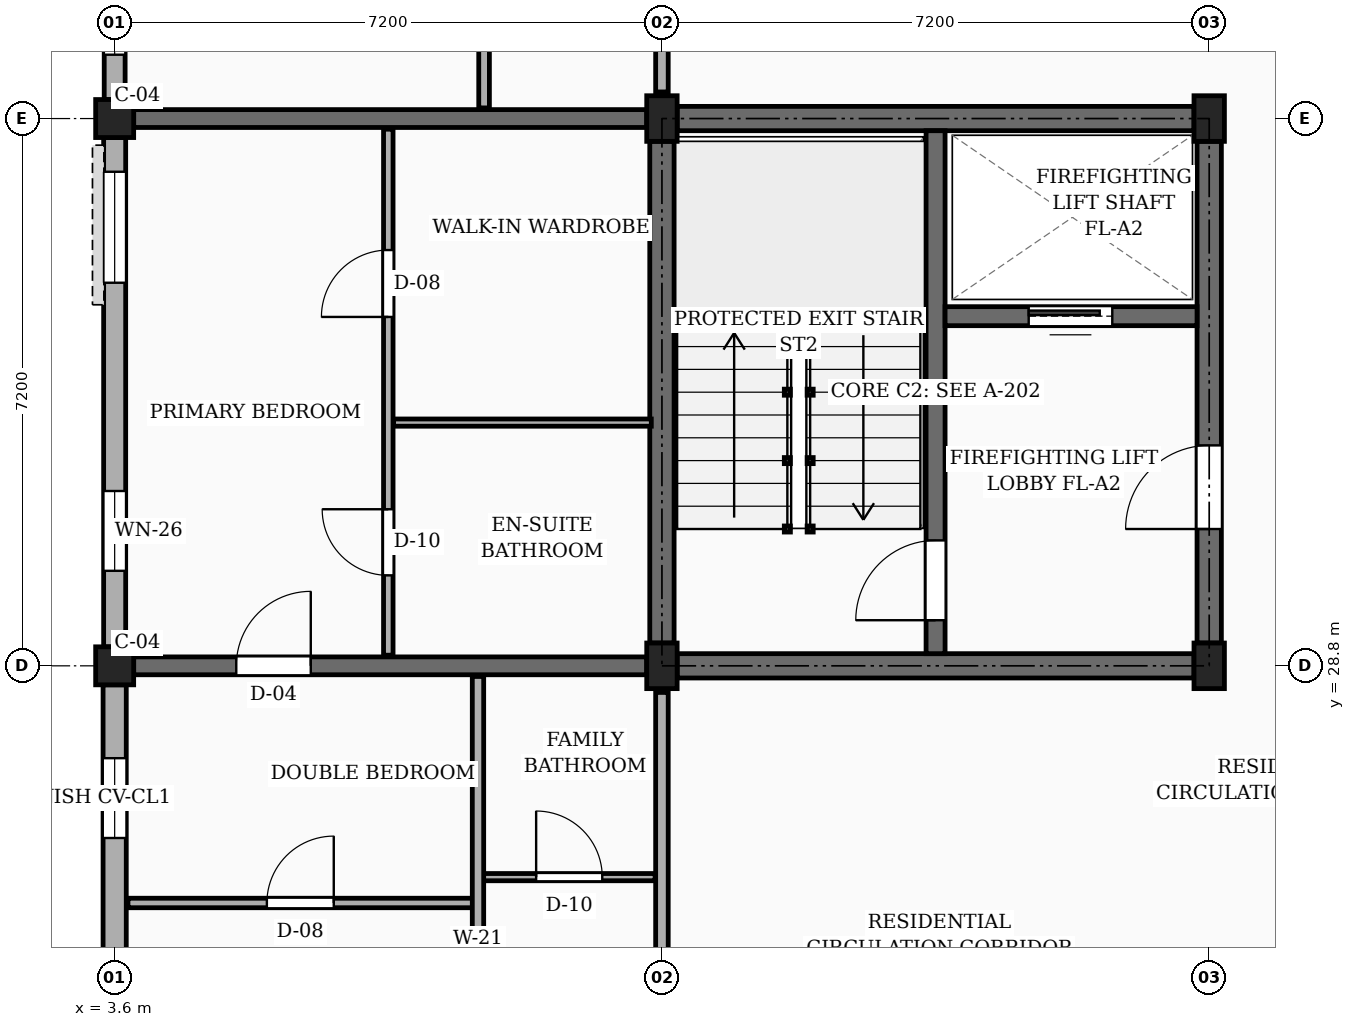
"""IFC4 building model, lengths in metres.
Left out: names, types, materials, properties, quantities, classifications, styles, units other than length and angle.
Written with IfcOpenShell. Run it as: python <this file> out.ifc"""

import sys

from ifc_helpers import new_model, si_unit, direction, frame, frame_2d, origin, origin_2d, place, context, subcontext, project, spatial, rectangle, extrude, element, fill, save


model = new_model("IFC4")
c1 = context("Model", 3, precision=1e-05, world=origin(), true_north=direction((0.0, 1.0)))
c2 = subcontext(c1, "Body", "Model", "MODEL_VIEW")
j1 = project(units=[si_unit("LENGTHUNIT", "METRE"), si_unit("PLANEANGLEUNIT", "RADIAN")], contexts=[c1])
p1 = place(None, origin())
s1 = spatial("IfcSite", under=j1, at=p1, CompositionType="ELEMENT")
p2 = place(p1, origin())
s2 = spatial("IfcBuilding", under=s1, at=p2, CompositionType="ELEMENT")
p3 = place(p2, frame((0.0, 0.0, 23.4)))
s3 = spatial("IfcBuildingStorey", under=s2, at=p3, CompositionType="ELEMENT", Elevation=23.4)
for number, where, z_axis, x_axis in (
    (1, (3.6, 28.8, 0.0), (0.0, 0.0, 1.0), (1.0, 0.0, 0.0)),
    (2, (3.6, 36.0, 0.0), (0.0, 0.0, 1.0), (1.0, 0.0, 0.0)),
):
    element("IfcColumn", number, at=place(p3, frame(where, z_axis=z_axis, x_axis=x_axis)), inside=s3, PredefinedType="COLUMN", context=c2, shape_type="SweptSolid", body=[
        extrude(rectangle(XDim=0.5, YDim=0.5, at=origin_2d()), origin(), (0.0, 0.0, 1.0), 3.15),
    ])
for number, where, z_axis, x_axis in (
    (3, (10.8, 28.8, 0.0), (0.0, 0.0, 1.0), (1.0, 0.0, 0.0)),
    (4, (10.8, 36.0, 0.0), (0.0, 0.0, 1.0), (1.0, 0.0, 0.0)),
    (5, (18.0, 28.8, 0.0), (0.0, 0.0, 1.0), (1.0, 0.0, 0.0)),
    (6, (18.0, 36.0, 0.0), (0.0, 0.0, 1.0), (1.0, 0.0, 0.0)),
):
    element("IfcColumn", number, at=place(p3, frame(where, z_axis=z_axis, x_axis=x_axis)), inside=s3, PredefinedType="COLUMN", context=c2, shape_type="SweptSolid", body=[
        extrude(rectangle(XDim=0.4, YDim=0.6, at=origin_2d()), origin(), (0.0, 0.0, 1.0), 3.15),
    ])
p4 = place(p3, frame((3.85, 28.8, 0.0), z_axis=(0.0, 0.0, 1.0), x_axis=(1.0, 0.0, 0.0)))
e7 = element("IfcWall", 7, at=p4, inside=s3, PredefinedType="SOLIDWALL", context=c2, shape_type="SweptSolid", body=[
    extrude(rectangle(XDim=6.75, YDim=0.235, at=frame_2d((3.375, 0.0))), origin(), (0.0, 0.0, 1.0), 2.17),
])
p5 = place(p4, frame((1.35, 0.0, 0.0)))
e8 = element("IfcOpeningElement", 8, at=p5, cuts=e7, PredefinedType="OPENING", context=c2, shape_type="SweptSolid", body=[
    extrude(rectangle(XDim=0.98, YDim=2.12, at=frame_2d((0.49, 1.06))), frame((0.0, 0.127, 0.0), z_axis=(0.0, -1.0, 0.0), x_axis=(1.0, 0.0, 0.0)), (0.0, 0.0, 1.0), 0.255),
])
p6 = place(p3, frame((3.85, 36.0, 0.0), z_axis=(0.0, 0.0, 1.0), x_axis=(1.0, 0.0, 0.0)))
e9 = element("IfcWall", 9, at=p6, inside=s3, PredefinedType="SOLIDWALL", context=c2, shape_type="SweptSolid", body=[
    extrude(rectangle(XDim=6.75, YDim=0.235, at=frame_2d((3.375, 0.0))), origin(), (0.0, 0.0, 1.0), 2.17),
])
p7 = place(p3, frame((3.6, 42.95, 0.0), z_axis=(0.0, 0.0, 1.0), x_axis=(0.0, -1.0, 0.0)))
e10 = element("IfcWall", 10, at=p7, inside=s3, PredefinedType="SOLIDWALL", context=c2, shape_type="SweptSolid", body=[
    extrude(rectangle(XDim=6.7, YDim=0.275, at=frame_2d((3.35, 0.0))), origin(), (0.0, 0.0, 1.0), 2.44),
])
p8 = place(p7, frame((0.45, 0.0, 0.78)))
e11 = element("IfcOpeningElement", 11, at=p8, cuts=e10, PredefinedType="OPENING", context=c2, shape_type="SweptSolid", body=[
    extrude(rectangle(XDim=1.3, YDim=1.36, at=frame_2d((0.65, 0.68))), frame((0.0, 0.147, 0.0), z_axis=(0.0, -1.0, 0.0), x_axis=(1.0, 0.0, 0.0)), (0.0, 0.0, 1.0), 0.295),
])
p9 = place(p7, frame((4.65, 0.0, 0.78)))
e12 = element("IfcOpeningElement", 12, at=p9, cuts=e10, PredefinedType="OPENING", context=c2, shape_type="SweptSolid", body=[
    extrude(rectangle(XDim=1.46, YDim=1.36, at=frame_2d((0.73, 0.68))), frame((0.0, 0.147, 0.0), z_axis=(0.0, -1.0, 0.0), x_axis=(1.0, 0.0, 0.0)), (0.0, 0.0, 1.0), 0.295),
])
p10 = place(p3, frame((3.6, 35.75, 0.0), z_axis=(0.0, 0.0, 1.0), x_axis=(0.0, -1.0, 0.0)))
e13 = element("IfcWall", 13, at=p10, inside=s3, PredefinedType="SOLIDWALL", context=c2, shape_type="SweptSolid", body=[
    extrude(rectangle(XDim=6.7, YDim=0.29, at=frame_2d((3.35, 0.0))), origin(), (0.0, 0.0, 1.0), 2.44),
])
p11 = place(p10, frame((0.45, 0.0, 0.78)))
e14 = element("IfcOpeningElement", 14, at=p11, cuts=e13, PredefinedType="OPENING", context=c2, shape_type="SweptSolid", body=[
    extrude(rectangle(XDim=1.46, YDim=1.36, at=frame_2d((0.73, 0.68))), frame((0.0, 0.155, 0.0), z_axis=(0.0, -1.0, 0.0), x_axis=(1.0, 0.0, 0.0)), (0.0, 0.0, 1.0), 0.31),
])
p12 = place(p10, frame((4.65, 0.0, 0.78)))
e15 = element("IfcOpeningElement", 15, at=p12, cuts=e13, PredefinedType="OPENING", context=c2, shape_type="SweptSolid", body=[
    extrude(rectangle(XDim=1.05, YDim=1.44, at=frame_2d((0.525, 0.72))), frame((0.0, 0.155, 0.0), z_axis=(0.0, -1.0, 0.0), x_axis=(1.0, 0.0, 0.0)), (0.0, 0.0, 1.0), 0.31),
])
p13 = place(p3, frame((3.6, 28.55, 0.0), z_axis=(0.0, 0.0, 1.0), x_axis=(0.0, -1.0, 0.0)))
e16 = element("IfcWall", 16, at=p13, inside=s3, PredefinedType="SOLIDWALL", context=c2, shape_type="SweptSolid", body=[
    extrude(rectangle(XDim=3.93, YDim=0.305, at=frame_2d((1.965, 0.0))), origin(), (0.0, 0.0, 1.0), 2.44),
])
p14 = place(p13, frame((0.965, 0.0, 0.78)))
e17 = element("IfcOpeningElement", 17, at=p14, cuts=e16, PredefinedType="OPENING", context=c2, shape_type="SweptSolid", body=[
    extrude(rectangle(XDim=1.05, YDim=1.44, at=frame_2d((0.525, 0.72))), frame((0.0, 0.163, 0.0), z_axis=(0.0, -1.0, 0.0), x_axis=(1.0, 0.0, 0.0)), (0.0, 0.0, 1.0), 0.325),
])
p15 = place(p3, frame((10.8, 29.1, 0.0), z_axis=(0.0, 0.0, 1.0), x_axis=(0.0, 1.0, 0.0)))
e18 = element("IfcWall", 18, at=p15, inside=s3, PredefinedType="SHEAR", context=c2, shape_type="SweptSolid", body=[
    extrude(rectangle(XDim=6.6, YDim=0.32, at=frame_2d((3.3, 0.0))), origin(), (0.0, 0.0, 1.0), 2.87),
])
p16 = place(p3, frame((11.0, 36.0, 0.0), z_axis=(0.0, 0.0, 1.0), x_axis=(1.0, 0.0, 0.0)))
e19 = element("IfcWall", 19, at=p16, inside=s3, PredefinedType="SHEAR", context=c2, shape_type="SweptSolid", body=[
    extrude(rectangle(XDim=6.8, YDim=0.32, at=frame_2d((3.4, 0.0))), origin(), (0.0, 0.0, 1.0), 2.87),
])
p17 = place(p3, frame((18.0, 29.1, 0.0), z_axis=(0.0, 0.0, 1.0), x_axis=(0.0, 1.0, 0.0)))
e20 = element("IfcWall", 20, at=p17, inside=s3, PredefinedType="SHEAR", context=c2, shape_type="SweptSolid", body=[
    extrude(rectangle(XDim=6.6, YDim=0.32, at=frame_2d((3.3, 0.0))), origin(), (0.0, 0.0, 1.0), 2.87),
])
p18 = place(p17, frame((1.5, 0.0, 0.0)))
e21 = element("IfcOpeningElement", 21, at=p18, cuts=e20, PredefinedType="OPENING", context=c2, shape_type="SweptSolid", body=[
    extrude(rectangle(XDim=1.1, YDim=2.15, at=frame_2d((0.55, 1.075))), frame((0.0, 0.17, 0.0), z_axis=(0.0, -1.0, 0.0), x_axis=(1.0, 0.0, 0.0)), (0.0, 0.0, 1.0), 0.34),
])
p19 = place(p3, frame((11.0, 28.8, 0.0), z_axis=(0.0, 0.0, 1.0), x_axis=(1.0, 0.0, 0.0)))
e22 = element("IfcWall", 22, at=p19, inside=s3, PredefinedType="SHEAR", context=c2, shape_type="SweptSolid", body=[
    extrude(rectangle(XDim=6.8, YDim=0.32, at=frame_2d((3.4, 0.0))), origin(), (0.0, 0.0, 1.0), 2.87),
])
p20 = place(p3, frame((14.4, 28.96, 0.0), z_axis=(0.0, 0.0, 1.0), x_axis=(0.0, 1.0, 0.0)))
e23 = element("IfcWall", 23, at=p20, inside=s3, PredefinedType="SHEAR", context=c2, shape_type="SweptSolid", body=[
    extrude(rectangle(XDim=6.88, YDim=0.25, at=frame_2d((3.44, 0.0))), origin(), (0.0, 0.0, 1.0), 2.87),
])
p21 = place(p20, frame((0.44, 0.0, 0.0)))
e24 = element("IfcOpeningElement", 24, at=p21, cuts=e23, PredefinedType="OPENING", context=c2, shape_type="SweptSolid", body=[
    extrude(rectangle(XDim=1.05, YDim=2.15, at=frame_2d((0.525, 1.075))), frame((0.0, 0.135, 0.0), z_axis=(0.0, -1.0, 0.0), x_axis=(1.0, 0.0, 0.0)), (0.0, 0.0, 1.0), 0.27),
])
p22 = place(p3, frame((14.525, 33.4, 0.0), z_axis=(0.0, 0.0, 1.0), x_axis=(1.0, 0.0, 0.0)))
e25 = element("IfcWall", 25, at=p22, inside=s3, PredefinedType="SHEAR", context=c2, shape_type="SweptSolid", body=[
    extrude(rectangle(XDim=3.315, YDim=0.25, at=frame_2d((1.658, 0.0))), origin(), (0.0, 0.0, 1.0), 2.87),
])
p23 = place(p22, frame((1.1, 0.0, 0.0)))
e26 = element("IfcOpeningElement", 26, at=p23, cuts=e25, PredefinedType="OPENING", context=c2, shape_type="SweptSolid", body=[
    extrude(rectangle(XDim=1.1, YDim=2.2, at=frame_2d((0.55, 1.1))), frame((0.0, 0.135, 0.0), z_axis=(0.0, -1.0, 0.0), x_axis=(1.0, 0.0, 0.0)), (0.0, 0.0, 1.0), 0.27),
])
p24 = place(p3, frame((10.8, 21.95, 0.0), z_axis=(0.0, 0.0, 1.0), x_axis=(0.0, 1.0, 0.0)))
e27 = element("IfcWall", 27, at=p24, inside=s3, PredefinedType="PARTITIONING", context=c2, shape_type="SweptSolid", body=[
    extrude(rectangle(XDim=6.5, YDim=0.165, at=frame_2d((3.25, 0.0))), origin(), (0.0, 0.0, 1.0), 2.305),
])
p25 = place(p24, frame((1.0, 0.0, 0.0)))
e28 = element("IfcOpeningElement", 28, at=p25, cuts=e27, PredefinedType="OPENING", context=c2, shape_type="SweptSolid", body=[
    extrude(rectangle(XDim=1.14, YDim=2.18, at=frame_2d((0.57, 1.09))), frame((0.0, 0.093, 0.0), z_axis=(0.0, -1.0, 0.0), x_axis=(1.0, 0.0, 0.0)), (0.0, 0.0, 1.0), 0.185),
])
p26 = place(p3, frame((10.8, 36.35, 0.0), z_axis=(0.0, 0.0, 1.0), x_axis=(0.0, 1.0, 0.0)))
e29 = element("IfcWall", 29, at=p26, inside=s3, PredefinedType="PARTITIONING", context=c2, shape_type="SweptSolid", body=[
    extrude(rectangle(XDim=6.5, YDim=0.165, at=frame_2d((3.25, 0.0))), origin(), (0.0, 0.0, 1.0), 2.305),
])
p27 = place(p26, frame((1.0, 0.0, 0.0)))
e30 = element("IfcOpeningElement", 30, at=p27, cuts=e29, PredefinedType="OPENING", context=c2, shape_type="SweptSolid", body=[
    extrude(rectangle(XDim=1.0, YDim=2.15, at=frame_2d((0.5, 1.075))), frame((0.0, 0.093, 0.0), z_axis=(0.0, -1.0, 0.0), x_axis=(1.0, 0.0, 0.0)), (0.0, 0.0, 1.0), 0.185),
])
p28 = place(p3, frame((3.775, 25.68, 0.0), z_axis=(0.0, 0.0, 1.0), x_axis=(1.0, 0.0, 0.0)))
e31 = element("IfcWall", 31, at=p28, inside=s3, PredefinedType="PARTITIONING", context=c2, shape_type="SweptSolid", body=[
    extrude(rectangle(XDim=4.535, YDim=0.125, at=frame_2d((2.268, 0.0))), origin(), (0.0, 0.0, 1.0), 2.305),
])
p29 = place(p28, frame((1.827, 0.0, 0.0)))
e32 = element("IfcOpeningElement", 32, at=p29, cuts=e31, PredefinedType="OPENING", context=c2, shape_type="SweptSolid", body=[
    extrude(rectangle(XDim=0.88, YDim=2.08, at=frame_2d((0.44, 1.04))), frame((0.0, 0.073, 0.0), z_axis=(0.0, -1.0, 0.0), x_axis=(1.0, 0.0, 0.0)), (0.0, 0.0, 1.0), 0.145),
])
p30 = place(p3, frame((8.45, 26.02, 0.0), z_axis=(0.0, 0.0, 1.0), x_axis=(1.0, 0.0, 0.0)))
e33 = element("IfcWall", 33, at=p30, inside=s3, PredefinedType="PARTITIONING", context=c2, shape_type="SweptSolid", body=[
    extrude(rectangle(XDim=2.26, YDim=0.095, at=frame_2d((1.13, 0.0))), origin(), (0.0, 0.0, 1.0), 2.305),
])
p31 = place(p30, frame((0.695, 0.0, 0.0)))
e34 = element("IfcOpeningElement", 34, at=p31, cuts=e33, PredefinedType="OPENING", context=c2, shape_type="SweptSolid", body=[
    extrude(rectangle(XDim=0.87, YDim=2.05, at=frame_2d((0.435, 1.025))), frame((0.0, 0.058, 0.0), z_axis=(0.0, -1.0, 0.0), x_axis=(1.0, 0.0, 0.0)), (0.0, 0.0, 1.0), 0.115),
])
p32 = place(p3, frame((8.38, 21.74, 0.0), z_axis=(0.0, 0.0, 1.0), x_axis=(0.0, 1.0, 0.0)))
e35 = element("IfcWall", 35, at=p32, inside=s3, PredefinedType="PARTITIONING", context=c2, shape_type="SweptSolid", body=[
    extrude(rectangle(XDim=6.92, YDim=0.15, at=frame_2d((3.46, 0.0))), origin(), (0.0, 0.0, 1.0), 2.305),
])
p33 = place(p32, frame((1.31, 0.0, 0.0)))
e36 = element("IfcOpeningElement", 36, at=p33, cuts=e35, PredefinedType="OPENING", context=c2, shape_type="SweptSolid", body=[
    extrude(rectangle(XDim=0.92, YDim=2.1, at=frame_2d((0.46, 1.05))), frame((0.0, 0.085, 0.0), z_axis=(0.0, -1.0, 0.0), x_axis=(1.0, 0.0, 0.0)), (0.0, 0.0, 1.0), 0.17),
])
p34 = place(p3, frame((7.2, 28.94, 0.0), z_axis=(0.0, 0.0, 1.0), x_axis=(0.0, 1.0, 0.0)))
e37 = element("IfcWall", 37, at=p34, inside=s3, PredefinedType="PARTITIONING", context=c2, shape_type="SweptSolid", body=[
    extrude(rectangle(XDim=6.92, YDim=0.125, at=frame_2d((3.46, 0.0))), origin(), (0.0, 0.0, 1.0), 2.305),
])
p35 = place(p34, frame((1.05, 0.0, 0.0)))
e38 = element("IfcOpeningElement", 38, at=p35, cuts=e37, PredefinedType="OPENING", context=c2, shape_type="SweptSolid", body=[
    extrude(rectangle(XDim=0.87, YDim=2.05, at=frame_2d((0.435, 1.025))), frame((0.0, 0.073, 0.0), z_axis=(0.0, -1.0, 0.0), x_axis=(1.0, 0.0, 0.0)), (0.0, 0.0, 1.0), 0.145),
])
p36 = place(p34, frame((4.45, 0.0, 0.0)))
e39 = element("IfcOpeningElement", 39, at=p36, cuts=e37, PredefinedType="OPENING", context=c2, shape_type="SweptSolid", body=[
    extrude(rectangle(XDim=0.88, YDim=2.08, at=frame_2d((0.44, 1.04))), frame((0.0, 0.073, 0.0), z_axis=(0.0, -1.0, 0.0), x_axis=(1.0, 0.0, 0.0)), (0.0, 0.0, 1.0), 0.145),
])
p37 = place(p3, frame((7.27, 32.0, 0.0), z_axis=(0.0, 0.0, 1.0), x_axis=(1.0, 0.0, 0.0)))
e40 = element("IfcWall", 40, at=p37, inside=s3, PredefinedType="PARTITIONING", context=c2, shape_type="SweptSolid", body=[
    extrude(rectangle(XDim=3.39, YDim=0.095, at=frame_2d((1.695, 0.0))), origin(), (0.0, 0.0, 1.0), 2.305),
])
p38 = place(p3, frame((8.46, 36.14, 0.0), z_axis=(0.0, 0.0, 1.0), x_axis=(0.0, 1.0, 0.0)))
e41 = element("IfcWall", 41, at=p38, inside=s3, PredefinedType="PARTITIONING", context=c2, shape_type="SweptSolid", body=[
    extrude(rectangle(XDim=6.885, YDim=0.14, at=frame_2d((3.442, 0.0))), origin(), (0.0, 0.0, 1.0), 2.305),
])
p39 = place(p38, frame((1.31, 0.0, 0.0)))
e42 = element("IfcOpeningElement", 42, at=p39, cuts=e41, PredefinedType="OPENING", context=c2, shape_type="SweptSolid", body=[
    extrude(rectangle(XDim=0.92, YDim=2.1, at=frame_2d((0.46, 1.05))), frame((0.0, 0.08, 0.0), z_axis=(0.0, -1.0, 0.0), x_axis=(1.0, 0.0, 0.0)), (0.0, 0.0, 1.0), 0.16),
])
p40 = place(p9, origin())
e43 = element("IfcWindow", 43, at=p40, inside=s3, PartitioningType="SINGLE_PANEL", PredefinedType="WINDOW", context=c2, shape_type="SweptSolid", body=[
    extrude(rectangle(XDim=1.46, YDim=1.36, at=frame_2d((0.73, 0.68))), frame((0.0, 0.03, 0.0), z_axis=(0.0, -1.0, 0.0), x_axis=(1.0, 0.0, 0.0)), (0.0, 0.0, 1.0), 0.06),
])
fill(e12, e43)
p41 = place(p11, origin())
e44 = element("IfcWindow", 44, at=p41, inside=s3, PartitioningType="SINGLE_PANEL", PredefinedType="WINDOW", context=c2, shape_type="SweptSolid", body=[
    extrude(rectangle(XDim=1.46, YDim=1.36, at=frame_2d((0.73, 0.68))), frame((0.0, 0.03, 0.0), z_axis=(0.0, -1.0, 0.0), x_axis=(1.0, 0.0, 0.0)), (0.0, 0.0, 1.0), 0.06),
])
fill(e14, e44)
p42 = place(p12, origin())
e45 = element("IfcWindow", 45, at=p42, inside=s3, PartitioningType="SINGLE_PANEL", PredefinedType="WINDOW", context=c2, shape_type="SweptSolid", body=[
    extrude(rectangle(XDim=1.05, YDim=1.44, at=frame_2d((0.525, 0.72))), frame((0.0, 0.03, 0.0), z_axis=(0.0, -1.0, 0.0), x_axis=(1.0, 0.0, 0.0)), (0.0, 0.0, 1.0), 0.06),
])
fill(e15, e45)
p43 = place(p14, origin())
e46 = element("IfcWindow", 46, at=p43, inside=s3, PartitioningType="SINGLE_PANEL", PredefinedType="WINDOW", context=c2, shape_type="SweptSolid", body=[
    extrude(rectangle(XDim=1.05, YDim=1.44, at=frame_2d((0.525, 0.72))), frame((0.0, 0.03, 0.0), z_axis=(0.0, -1.0, 0.0), x_axis=(1.0, 0.0, 0.0)), (0.0, 0.0, 1.0), 0.06),
])
fill(e17, e46)
p44 = place(p18, frame((1.1, 0.0, 0.0), z_axis=(0.0, 0.0, 1.0), x_axis=(-1.0, 0.0, 0.0)))
e47 = element("IfcDoor", 47, at=p44, inside=s3, OperationType="SINGLE_SWING_LEFT", PredefinedType="DOOR", context=c2, shape_type="SweptSolid", body=[
    extrude(rectangle(XDim=1.1, YDim=2.15, at=frame_2d((0.55, 1.075))), frame((0.0, 0.025, 0.0), z_axis=(0.0, -1.0, 0.0), x_axis=(1.0, 0.0, 0.0)), (0.0, 0.0, 1.0), 0.05),
])
fill(e21, e47)
p45 = place(p21, origin())
e48 = element("IfcDoor", 48, at=p45, inside=s3, OperationType="SINGLE_SWING_LEFT", PredefinedType="DOOR", context=c2, shape_type="SweptSolid", body=[
    extrude(rectangle(XDim=1.05, YDim=2.15, at=frame_2d((0.525, 1.075))), frame((0.0, 0.025, 0.0), z_axis=(0.0, -1.0, 0.0), x_axis=(1.0, 0.0, 0.0)), (0.0, 0.0, 1.0), 0.05),
])
fill(e24, e48)
p46 = place(p23, origin())
e49 = element("IfcDoor", 49, at=p46, inside=s3, OperationType="SLIDING_TO_LEFT", PredefinedType="DOOR", context=c2, shape_type="SweptSolid", body=[
    extrude(rectangle(XDim=1.1, YDim=2.2, at=frame_2d((0.55, 1.1))), frame((0.0, 0.025, 0.0), z_axis=(0.0, -1.0, 0.0), x_axis=(1.0, 0.0, 0.0)), (0.0, 0.0, 1.0), 0.05),
])
fill(e26, e49)
p47 = place(p29, origin())
e50 = element("IfcDoor", 50, at=p47, inside=s3, OperationType="SINGLE_SWING_RIGHT", PredefinedType="DOOR", context=c2, shape_type="SweptSolid", body=[
    extrude(rectangle(XDim=0.88, YDim=2.08, at=frame_2d((0.44, 1.04))), frame((0.0, 0.025, 0.0), z_axis=(0.0, -1.0, 0.0), x_axis=(1.0, 0.0, 0.0)), (0.0, 0.0, 1.0), 0.05),
])
fill(e32, e50)
p48 = place(p31, origin())
e51 = element("IfcDoor", 51, at=p48, inside=s3, OperationType="SINGLE_SWING_LEFT", PredefinedType="DOOR", context=c2, shape_type="SweptSolid", body=[
    extrude(rectangle(XDim=0.87, YDim=2.05, at=frame_2d((0.435, 1.025))), frame((0.0, 0.025, 0.0), z_axis=(0.0, -1.0, 0.0), x_axis=(1.0, 0.0, 0.0)), (0.0, 0.0, 1.0), 0.05),
])
fill(e34, e51)
p49 = place(p35, origin())
e52 = element("IfcDoor", 52, at=p49, inside=s3, OperationType="SINGLE_SWING_RIGHT", PredefinedType="DOOR", context=c2, shape_type="SweptSolid", body=[
    extrude(rectangle(XDim=0.87, YDim=2.05, at=frame_2d((0.435, 1.025))), frame((0.0, 0.025, 0.0), z_axis=(0.0, -1.0, 0.0), x_axis=(1.0, 0.0, 0.0)), (0.0, 0.0, 1.0), 0.05),
])
fill(e38, e52)
p50 = place(p36, origin())
e53 = element("IfcDoor", 53, at=p50, inside=s3, OperationType="SINGLE_SWING_LEFT", PredefinedType="DOOR", context=c2, shape_type="SweptSolid", body=[
    extrude(rectangle(XDim=0.88, YDim=2.08, at=frame_2d((0.44, 1.04))), frame((0.0, 0.025, 0.0), z_axis=(0.0, -1.0, 0.0), x_axis=(1.0, 0.0, 0.0)), (0.0, 0.0, 1.0), 0.05),
])
fill(e39, e53)
p51 = place(p5, origin())
e54 = element("IfcDoor", 54, at=p51, inside=s3, OperationType="SINGLE_SWING_RIGHT", PredefinedType="DOOR", context=c2, shape_type="SweptSolid", body=[
    extrude(rectangle(XDim=0.98, YDim=2.12, at=frame_2d((0.49, 1.06))), frame((0.0, 0.025, 0.0), z_axis=(0.0, -1.0, 0.0), x_axis=(1.0, 0.0, 0.0)), (0.0, 0.0, 1.0), 0.05),
])
fill(e8, e54)
save(model, sys.argv[1])
